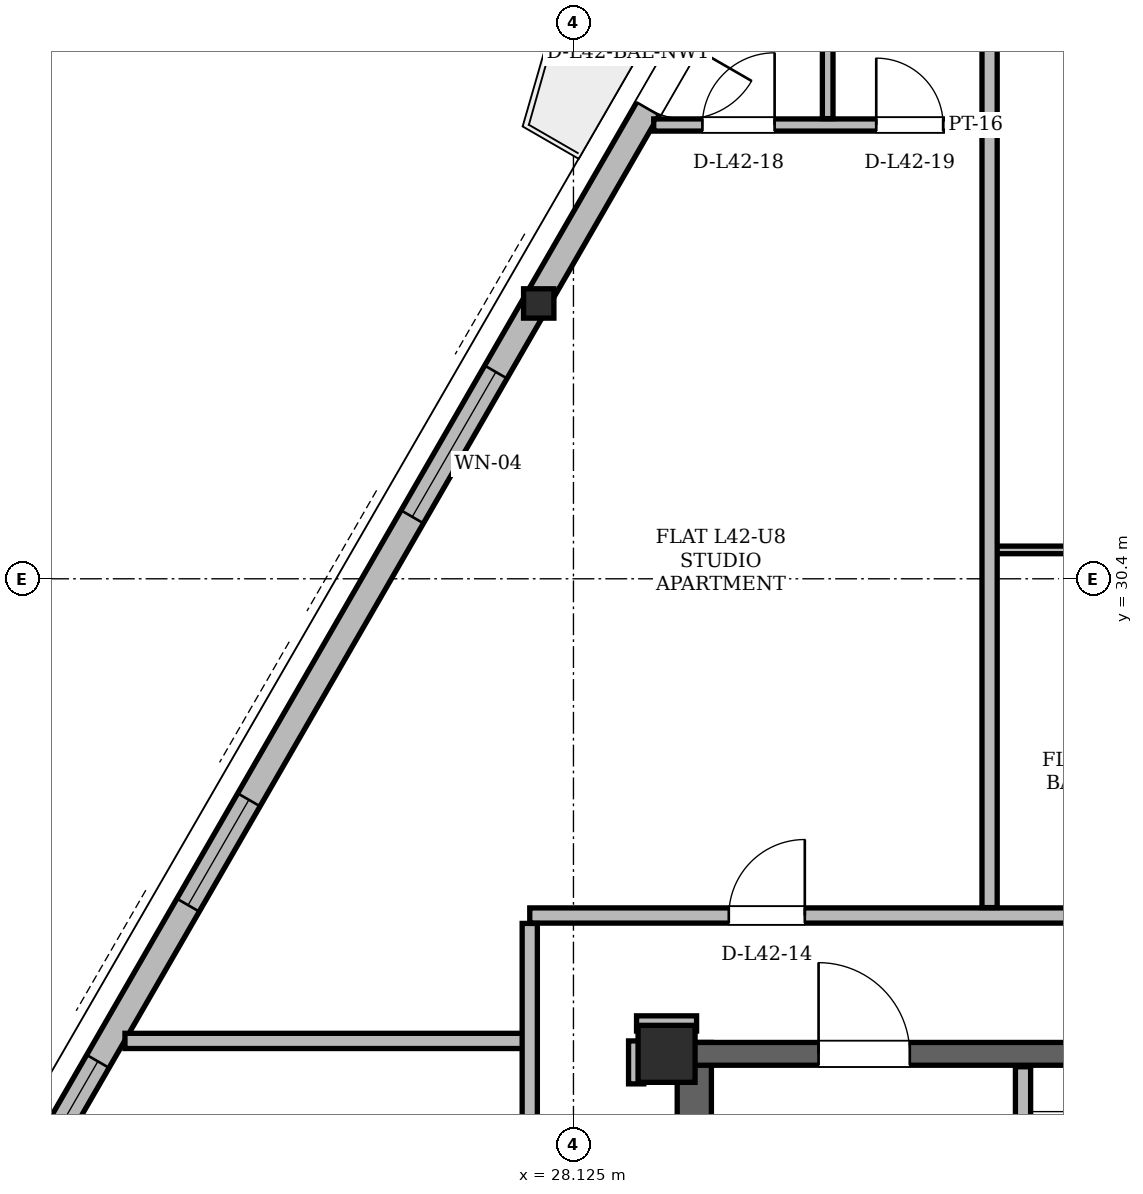
"""IFC4 building model, lengths in metres.
Left out: names, types, materials, properties, quantities, classifications, styles, units other than length and angle.
Written with IfcOpenShell. Run it as: python <this file> out.ifc"""

import sys

from ifc_helpers import new_model, si_unit, direction, frame, frame_2d, origin, origin_2d, place, context, subcontext, project, spatial, rectangle, hollow_rectangle, i_section, extrude, element, fill, save


model = new_model("IFC4")
c1 = context("Model", 3, precision=1e-05, world=origin(), true_north=direction((0.0, 1.0)))
c2 = subcontext(c1, "Body", "Model", "MODEL_VIEW")
j1 = project(units=[si_unit("LENGTHUNIT", "METRE"), si_unit("PLANEANGLEUNIT", "RADIAN")], contexts=[c1])
p1 = place(None, origin())
s1 = spatial("IfcSite", under=j1, at=p1, CompositionType="ELEMENT")
p2 = place(p1, origin())
s2 = spatial("IfcBuilding", under=s1, at=p2, CompositionType="ELEMENT")
p3 = place(p2, frame((0.0, 0.0, 160.2)))
s3 = spatial("IfcBuildingStorey", under=s2, at=p3, CompositionType="ELEMENT", Elevation=160.2)
p4 = place(p3, frame((29.35, 24.15, 0.0), z_axis=(0.0, 0.0, 1.0), x_axis=(1.0, 0.0, 0.0)))
e1 = element("IfcColumn", 1, at=p4, inside=s3, PredefinedType="COLUMN", context=c2, shape_type="SweptSolid", body=[
    extrude(hollow_rectangle(XDim=0.75, YDim=0.75, WallThickness=0.06, at=origin_2d()), origin(), (0.0, 0.0, 1.0), 3.6),
])
p5 = place(p3, frame((27.632, 34.035, 0.005), z_axis=(0.019984590736, -0.00734127823, 0.999773335195), x_axis=(0.34481746268, 0.938669759517, 0.0)))
e2 = element("IfcColumn", 2, at=p5, inside=s3, PredefinedType="COLUMN", context=c2, shape_type="SweptSolid", body=[
    extrude(i_section(OverallWidth=0.399, OverallDepth=0.386, WebThickness=0.021, FlangeThickness=0.033, at=origin_2d()), origin(), (0.0, 0.0, 1.0), 3.592),
])
p6 = place(p3, frame((29.715, 11.0, 0.0), z_axis=(0.0, 0.0, 1.0), x_axis=(0.0, 1.0, 0.0)))
e3 = element("IfcWall", 3, at=p6, inside=s3, PredefinedType="SHEAR", context=c2, shape_type="SweptSolid", body=[
    extrude(rectangle(XDim=13.3, YDim=0.45, at=frame_2d((6.65, 0.0))), origin(), (0.0, 0.0, 1.0), 3.38),
])
p7 = place(p3, frame((29.65, 24.15, 0.0), z_axis=(0.0, 0.0, 1.0), x_axis=(1.0, 0.0, 0.0)))
e4 = element("IfcWall", 4, at=p7, inside=s3, PredefinedType="SHEAR", context=c2, shape_type="SweptSolid", body=[
    extrude(rectangle(XDim=15.7, YDim=0.3, at=frame_2d((7.85, 0.0))), origin(), (0.0, 0.0, 1.0), 3.38),
])
p8 = place(p7, frame((1.7, 0.0, 0.0)))
e5 = element("IfcOpeningElement", 5, at=p8, cuts=e4, PredefinedType="OPENING", context=c2, shape_type="SweptSolid", body=[
    extrude(rectangle(XDim=1.2, YDim=2.2, at=frame_2d((0.6, 1.1))), frame((0.0, 0.15, 0.0), z_axis=(0.0, -1.0, 0.0), x_axis=(1.0, 0.0, 0.0)), (0.0, 0.0, 1.0), 0.3),
])
p9 = place(p7, frame((12.8, 0.0, 0.0)))
e6 = element("IfcOpeningElement", 6, at=p9, cuts=e4, PredefinedType="OPENING", context=c2, shape_type="SweptSolid", body=[
    extrude(rectangle(XDim=1.2, YDim=2.2, at=frame_2d((0.6, 1.1))), frame((0.0, 0.15, 0.0), z_axis=(0.0, -1.0, 0.0), x_axis=(1.0, 0.0, 0.0)), (0.0, 0.0, 1.0), 0.3),
])
p10 = place(p7, frame((6.55, 0.0, 0.0)))
e7 = element("IfcOpeningElement", 7, at=p10, cuts=e4, PredefinedType="OPENING", context=c2, shape_type="SweptSolid", body=[
    extrude(rectangle(XDim=0.9, YDim=2.05, at=frame_2d((0.45, 1.025))), frame((0.0, 0.15, 0.0), z_axis=(0.0, -1.0, 0.0), x_axis=(1.0, 0.0, 0.0)), (0.0, 0.0, 1.0), 0.3),
])
p11 = place(p7, frame((8.45, 0.0, 0.0)))
e8 = element("IfcOpeningElement", 8, at=p11, cuts=e4, PredefinedType="OPENING", context=c2, shape_type="SweptSolid", body=[
    extrude(rectangle(XDim=0.9, YDim=2.05, at=frame_2d((0.45, 1.025))), frame((0.0, 0.15, 0.0), z_axis=(0.0, -1.0, 0.0), x_axis=(1.0, 0.0, 0.0)), (0.0, 0.0, 1.0), 0.3),
])
p12 = place(p3, frame((32.983, 43.303, 0.0), z_axis=(0.0, 0.0, 1.0), x_axis=(-0.499995364632, -0.866028079999, 0.0)))
e9 = element("IfcWall", 9, at=p12, inside=s3, PredefinedType="SOLIDWALL", context=c2, shape_type="SweptSolid", body=[
    extrude(rectangle(XDim=35.673, YDim=0.34, at=frame_2d((17.836, 0.0))), origin(), (0.0, 0.0, 1.0), 2.6),
])
p13 = place(p12, frame((6.76, 0.0, 0.0)))
e10 = element("IfcOpeningElement", 10, at=p13, cuts=e9, PredefinedType="OPENING", context=c2, shape_type="SweptSolid", body=[
    extrude(rectangle(XDim=1.0, YDim=2.18, at=frame_2d((0.5, 1.09))), frame((0.0, 0.17, 0.0), z_axis=(0.0, -1.0, 0.0), x_axis=(1.0, 0.0, 0.0)), (0.0, 0.0, 1.0), 0.34),
])
p14 = place(p12, frame((26.558, 0.0, 0.0)))
e11 = element("IfcOpeningElement", 11, at=p14, cuts=e9, PredefinedType="OPENING", context=c2, shape_type="SweptSolid", body=[
    extrude(rectangle(XDim=1.5, YDim=2.2, at=frame_2d((0.75, 1.1))), frame((0.0, 0.17, 0.0), z_axis=(0.0, -1.0, 0.0), x_axis=(1.0, 0.0, 0.0)), (0.0, 0.0, 1.0), 0.34),
])
p15 = place(p12, frame((22.231, 0.0, 0.85)))
e12 = element("IfcOpeningElement", 12, at=p15, cuts=e9, PredefinedType="OPENING", context=c2, shape_type="SweptSolid", body=[
    extrude(rectangle(XDim=1.2, YDim=1.48, at=frame_2d((0.6, 0.74))), frame((0.0, 0.17, 0.0), z_axis=(0.0, -1.0, 0.0), x_axis=(1.0, 0.0, 0.0)), (0.0, 0.0, 1.0), 0.34),
])
p16 = place(p12, frame((11.758, 0.0, 0.85)))
e13 = element("IfcOpeningElement", 13, at=p16, cuts=e9, PredefinedType="OPENING", context=c2, shape_type="SweptSolid", body=[
    extrude(rectangle(XDim=2.2, YDim=1.64, at=frame_2d((1.1, 0.82))), frame((0.0, 0.17, 0.0), z_axis=(0.0, -1.0, 0.0), x_axis=(1.0, 0.0, 0.0)), (0.0, 0.0, 1.0), 0.34),
])
p17 = place(p12, frame((18.257, 0.0, 0.85)))
e14 = element("IfcOpeningElement", 14, at=p17, cuts=e9, PredefinedType="OPENING", context=c2, shape_type="SweptSolid", body=[
    extrude(rectangle(XDim=1.6, YDim=1.64, at=frame_2d((0.8, 0.82))), frame((0.0, 0.17, 0.0), z_axis=(0.0, -1.0, 0.0), x_axis=(1.0, 0.0, 0.0)), (0.0, 0.0, 1.0), 0.34),
])
p18 = place(p12, frame((1.108, 0.0, 0.85)))
e15 = element("IfcOpeningElement", 15, at=p18, cuts=e9, PredefinedType="OPENING", context=c2, shape_type="SweptSolid", body=[
    extrude(rectangle(XDim=1.8, YDim=1.64, at=frame_2d((0.9, 0.82))), frame((0.0, 0.17, 0.0), z_axis=(0.0, -1.0, 0.0), x_axis=(1.0, 0.0, 0.0)), (0.0, 0.0, 1.0), 0.34),
])
p19 = place(p12, frame((30.513, 0.0, 0.85)))
e16 = element("IfcOpeningElement", 16, at=p19, cuts=e9, PredefinedType="OPENING", context=c2, shape_type="SweptSolid", body=[
    extrude(rectangle(XDim=1.2, YDim=1.48, at=frame_2d((0.6, 0.74))), frame((0.0, 0.17, 0.0), z_axis=(0.0, -1.0, 0.0), x_axis=(1.0, 0.0, 0.0)), (0.0, 0.0, 1.0), 0.34),
])
p20 = place(p3, frame((34.04, 19.48, 0.0), z_axis=(0.0, 0.0, 1.0), x_axis=(0.0, 1.0, 0.0)))
e17 = element("IfcWall", 17, at=p20, inside=s3, PredefinedType="PARTITIONING", context=c2, shape_type="SweptSolid", body=[
    extrude(rectangle(XDim=4.5, YDim=0.2, at=frame_2d((2.25, 0.0))), origin(), (0.0, 0.0, 1.0), 2.42),
])
p21 = place(p20, frame((2.12, 0.0, 0.0)))
e18 = element("IfcOpeningElement", 18, at=p21, cuts=e17, PredefinedType="OPENING", context=c2, shape_type="SweptSolid", body=[
    extrude(rectangle(XDim=1.1, YDim=2.2, at=frame_2d((0.55, 1.1))), frame((0.0, 0.1, 0.0), z_axis=(0.0, -1.0, 0.0), x_axis=(1.0, 0.0, 0.0)), (0.0, 0.0, 1.0), 0.2),
])
p22 = place(p3, frame((22.224, 24.32, 0.0), z_axis=(0.0, 0.0, 1.0), x_axis=(1.0, 0.0, 0.0)))
e19 = element("IfcWall", 19, at=p22, inside=s3, PredefinedType="PARTITIONING", context=c2, shape_type="SweptSolid", body=[
    extrude(rectangle(XDim=5.326, YDim=0.2, at=frame_2d((2.663, 0.0))), origin(), (0.0, 0.0, 1.0), 3.38),
])
p23 = place(p3, frame((28.955, 24.55, 0.0), z_axis=(0.0, 0.0, 1.0), x_axis=(1.0, 0.0, 0.0)))
e20 = element("IfcWall", 20, at=p23, inside=s3, PredefinedType="PARTITIONING", context=c2, shape_type="SweptSolid", body=[
    extrude(rectangle(XDim=0.79, YDim=0.2, at=frame_2d((0.395, 0.0))), origin(), (0.0, 0.0, 1.0), 2.842),
])
p24 = place(p3, frame((27.55, 25.97, 0.0), z_axis=(0.0, 0.0, 1.0), x_axis=(1.0, 0.0, 0.0)))
e21 = element("IfcWall", 21, at=p24, inside=s3, PredefinedType="PARTITIONING", context=c2, shape_type="SweptSolid", body=[
    extrude(rectangle(XDim=9.15, YDim=0.2, at=frame_2d((4.575, 0.0))), origin(), (0.0, 0.0, 1.0), 2.842),
])
p25 = place(p24, frame((2.619, 0.0, 0.0)))
e22 = element("IfcOpeningElement", 22, at=p25, cuts=e21, PredefinedType="OPENING", context=c2, shape_type="SweptSolid", body=[
    extrude(rectangle(XDim=1.0, YDim=2.18, at=frame_2d((0.5, 1.09))), frame((0.0, 0.1, 0.0), z_axis=(0.0, -1.0, 0.0), x_axis=(1.0, 0.0, 0.0)), (0.0, 0.0, 1.0), 0.2),
])
p26 = place(p3, frame((33.518, 30.78, 0.0), z_axis=(0.0, 0.0, 1.0), x_axis=(1.0, 0.0, 0.0)))
e23 = element("IfcWall", 23, at=p26, inside=s3, PredefinedType="PARTITIONING", context=c2, shape_type="SweptSolid", body=[
    extrude(rectangle(XDim=3.264, YDim=0.1, at=frame_2d((1.632, 0.0))), origin(), (0.0, 0.0, 1.0), 3.38),
])
p27 = place(p26, frame((1.192, 0.0, 0.0)))
e24 = element("IfcOpeningElement", 24, at=p27, cuts=e23, PredefinedType="OPENING", context=c2, shape_type="SweptSolid", body=[
    extrude(rectangle(XDim=0.88, YDim=2.08, at=frame_2d((0.44, 1.04))), frame((0.0, 0.05, 0.0), z_axis=(0.0, -1.0, 0.0), x_axis=(1.0, 0.0, 0.0)), (0.0, 0.0, 1.0), 0.1),
])
p28 = place(p3, frame((29.181, 36.37, 0.0), z_axis=(0.0, 0.0, 1.0), x_axis=(1.0, 0.0, 0.0)))
e25 = element("IfcWall", 25, at=p28, inside=s3, PredefinedType="PARTITIONING", context=c2, shape_type="SweptSolid", body=[
    extrude(rectangle(XDim=4.469, YDim=0.16, at=frame_2d((2.234, 0.0))), origin(), (0.0, 0.0, 1.0), 2.842),
])
p29 = place(p28, frame((0.64, 0.0, 0.0)))
e26 = element("IfcOpeningElement", 26, at=p29, cuts=e25, PredefinedType="OPENING", context=c2, shape_type="SweptSolid", body=[
    extrude(rectangle(XDim=0.95, YDim=2.1, at=frame_2d((0.475, 1.05))), frame((0.0, 0.08, 0.0), z_axis=(0.0, -1.0, 0.0), x_axis=(1.0, 0.0, 0.0)), (0.0, 0.0, 1.0), 0.16),
])
p30 = place(p28, frame((2.928, 0.0, 0.0)))
e27 = element("IfcOpeningElement", 27, at=p30, cuts=e25, PredefinedType="OPENING", context=c2, shape_type="SweptSolid", body=[
    extrude(rectangle(XDim=0.88, YDim=2.08, at=frame_2d((0.44, 1.04))), frame((0.0, 0.08, 0.0), z_axis=(0.0, -1.0, 0.0), x_axis=(1.0, 0.0, 0.0)), (0.0, 0.0, 1.0), 0.16),
])
p31 = place(p3, frame((27.55, 18.554, 0.0), z_axis=(0.0, 0.0, 1.0), x_axis=(0.0, 1.0, 0.0)))
e28 = element("IfcWall", 28, at=p31, inside=s3, PredefinedType="PARTITIONING", context=c2, shape_type="SweptSolid", body=[
    extrude(rectangle(XDim=7.312, YDim=0.2, at=frame_2d((3.656, 0.0))), origin(), (0.0, 0.0, 1.0), 3.38),
])
p32 = place(p3, frame((28.95, 23.755, 0.0), z_axis=(0.0, 0.0, 1.0), x_axis=(0.0, 1.0, 0.0)))
e29 = element("IfcWall", 29, at=p32, inside=s3, PredefinedType="PARTITIONING", context=c2, shape_type="SweptSolid", body=[
    extrude(rectangle(XDim=0.565, YDim=0.2, at=frame_2d((0.283, 0.0))), origin(), (0.0, 0.0, 1.0), 3.38),
])
p33 = place(p3, frame((31.47, 36.454, 0.0), z_axis=(0.0, 0.0, 1.0), x_axis=(0.0, 1.0, 0.0)))
e30 = element("IfcWall", 30, at=p33, inside=s3, PredefinedType="PARTITIONING", context=c2, shape_type="SweptSolid", body=[
    extrude(rectangle(XDim=3.88, YDim=0.14, at=frame_2d((1.94, 0.0))), origin(), (0.0, 0.0, 1.0), 3.38),
])
p34 = place(p3, frame((33.6, 26.074, 0.0), z_axis=(0.0, 0.0, 1.0), x_axis=(0.0, 1.0, 0.0)))
e31 = element("IfcWall", 31, at=p34, inside=s3, PredefinedType="PARTITIONING", context=c2, shape_type="SweptSolid", body=[
    extrude(rectangle(XDim=17.055, YDim=0.2, at=frame_2d((8.528, 0.0))), origin(), (0.0, 0.0, 1.0), 3.38),
])
p35 = place(p13, origin())
e32 = element("IfcDoor", 32, at=p35, inside=s3, OperationType="SINGLE_SWING_LEFT", PredefinedType="DOOR", context=c2, shape_type="SweptSolid", body=[
    extrude(rectangle(XDim=1.0, YDim=2.18, at=frame_2d((0.5, 1.09))), frame((0.0, 0.025, 0.0), z_axis=(0.0, -1.0, 0.0), x_axis=(1.0, 0.0, 0.0)), (0.0, 0.0, 1.0), 0.05),
])
fill(e10, e32)
p36 = place(p15, origin())
e33 = element("IfcWindow", 33, at=p36, inside=s3, PartitioningType="SINGLE_PANEL", PredefinedType="WINDOW", context=c2, shape_type="SweptSolid", body=[
    extrude(rectangle(XDim=1.2, YDim=1.48, at=frame_2d((0.6, 0.74))), frame((0.0, 0.03, 0.0), z_axis=(0.0, -1.0, 0.0), x_axis=(1.0, 0.0, 0.0)), (0.0, 0.0, 1.0), 0.06),
])
fill(e12, e33)
p37 = place(p16, origin())
e34 = element("IfcWindow", 34, at=p37, inside=s3, PartitioningType="SINGLE_PANEL", PredefinedType="WINDOW", context=c2, shape_type="SweptSolid", body=[
    extrude(rectangle(XDim=2.2, YDim=1.64, at=frame_2d((1.1, 0.82))), frame((0.0, 0.03, 0.0), z_axis=(0.0, -1.0, 0.0), x_axis=(1.0, 0.0, 0.0)), (0.0, 0.0, 1.0), 0.06),
])
fill(e13, e34)
p38 = place(p17, origin())
e35 = element("IfcWindow", 35, at=p38, inside=s3, PartitioningType="SINGLE_PANEL", PredefinedType="WINDOW", context=c2, shape_type="SweptSolid", body=[
    extrude(rectangle(XDim=1.6, YDim=1.64, at=frame_2d((0.8, 0.82))), frame((0.0, 0.03, 0.0), z_axis=(0.0, -1.0, 0.0), x_axis=(1.0, 0.0, 0.0)), (0.0, 0.0, 1.0), 0.06),
])
fill(e14, e35)
p39 = place(p8, origin())
e36 = element("IfcDoor", 36, at=p39, inside=s3, OperationType="SINGLE_SWING_LEFT", PredefinedType="DOOR", context=c2, shape_type="SweptSolid", body=[
    extrude(rectangle(XDim=1.2, YDim=2.2, at=frame_2d((0.6, 1.1))), frame((0.0, 0.025, 0.0), z_axis=(0.0, -1.0, 0.0), x_axis=(1.0, 0.0, 0.0)), (0.0, 0.0, 1.0), 0.05),
])
fill(e5, e36)
p40 = place(p25, origin())
e37 = element("IfcDoor", 37, at=p40, inside=s3, OperationType="SINGLE_SWING_RIGHT", PredefinedType="DOOR", context=c2, shape_type="SweptSolid", body=[
    extrude(rectangle(XDim=1.0, YDim=2.18, at=frame_2d((0.5, 1.09))), frame((0.0, 0.025, 0.0), z_axis=(0.0, -1.0, 0.0), x_axis=(1.0, 0.0, 0.0)), (0.0, 0.0, 1.0), 0.05),
])
fill(e22, e37)
p41 = place(p29, origin())
e38 = element("IfcDoor", 38, at=p41, inside=s3, OperationType="SINGLE_SWING_RIGHT", PredefinedType="DOOR", context=c2, shape_type="SweptSolid", body=[
    extrude(rectangle(XDim=0.95, YDim=2.1, at=frame_2d((0.475, 1.05))), frame((0.0, 0.025, 0.0), z_axis=(0.0, -1.0, 0.0), x_axis=(1.0, 0.0, 0.0)), (0.0, 0.0, 1.0), 0.05),
])
fill(e26, e38)
p42 = place(p30, origin())
e39 = element("IfcDoor", 39, at=p42, inside=s3, OperationType="SINGLE_SWING_LEFT", PredefinedType="DOOR", context=c2, shape_type="SweptSolid", body=[
    extrude(rectangle(XDim=0.88, YDim=2.08, at=frame_2d((0.44, 1.04))), frame((0.0, 0.025, 0.0), z_axis=(0.0, -1.0, 0.0), x_axis=(1.0, 0.0, 0.0)), (0.0, 0.0, 1.0), 0.05),
])
fill(e27, e39)
save(model, sys.argv[1])
